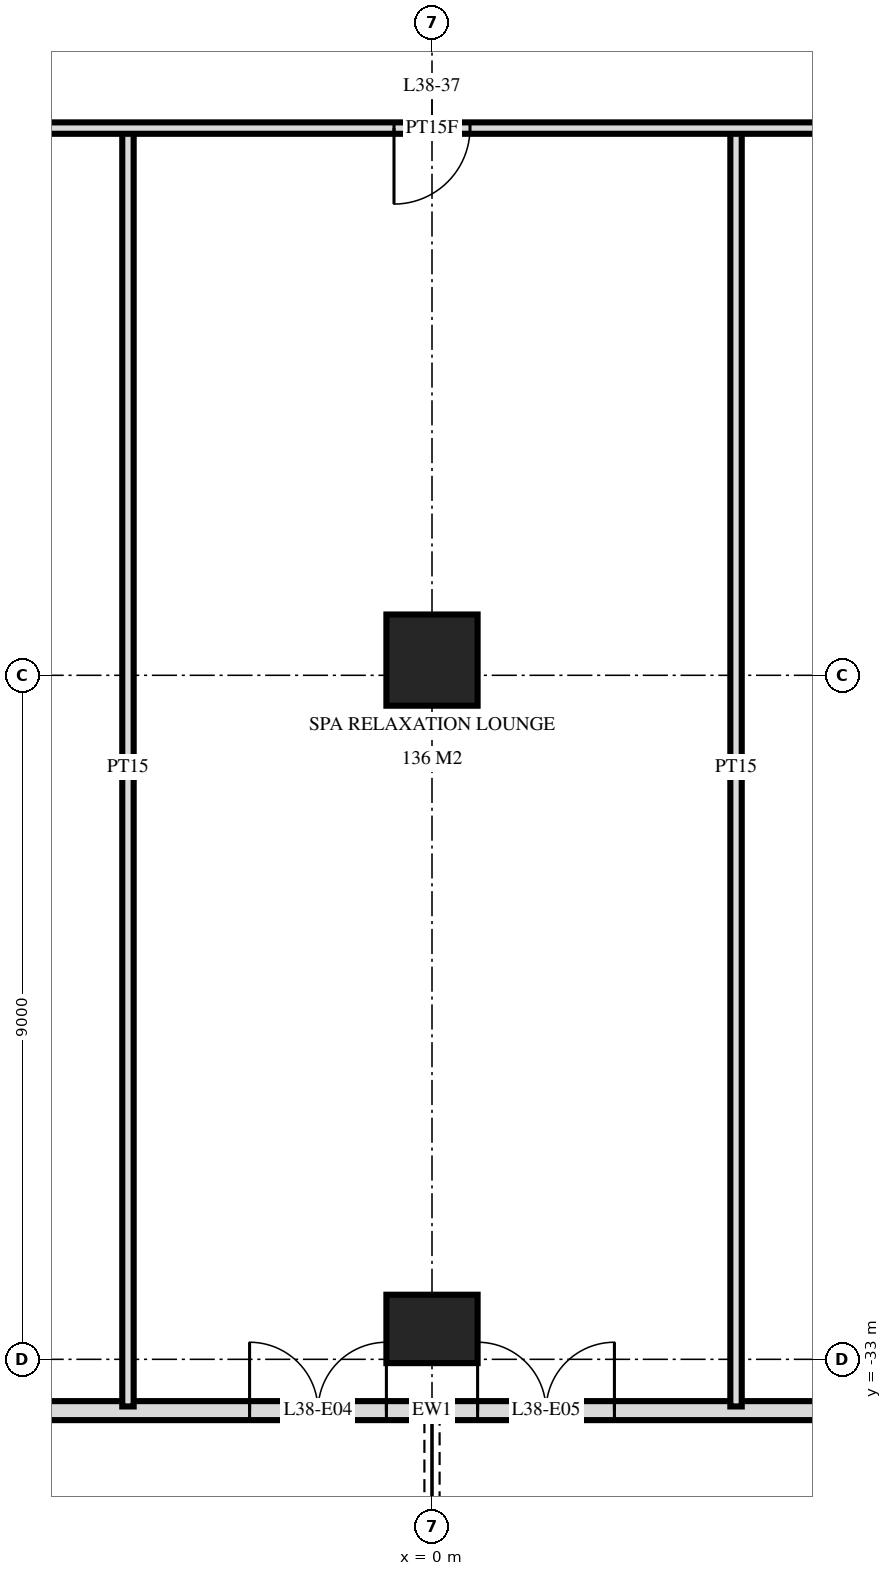
"""IFC4 building model, lengths in metres.
Left out: names, types, materials, properties, quantities, classifications, styles, units other than length and angle.
Written with IfcOpenShell. Run it as: python <this file> out.ifc"""

import sys

from ifc_helpers import new_model, si_unit, direction, frame, frame_2d, origin, origin_2d, place, context, subcontext, project, spatial, rectangle, extrude, element, fill, save


model = new_model("IFC4")
c1 = context("Model", 3, precision=1e-05, world=origin(), true_north=direction((0.0, 1.0)))
c2 = subcontext(c1, "Body", "Model", "MODEL_VIEW")
j1 = project(units=[si_unit("LENGTHUNIT", "METRE"), si_unit("PLANEANGLEUNIT", "RADIAN")], contexts=[c1])
p1 = place(None, origin())
s1 = spatial("IfcSite", under=j1, at=p1, CompositionType="ELEMENT")
p2 = place(p1, origin())
s2 = spatial("IfcBuilding", under=s1, at=p2, CompositionType="ELEMENT")
p3 = place(p2, frame((0.0, 0.0, 148.8)))
s3 = spatial("IfcBuildingStorey", under=s2, at=p3, CompositionType="ELEMENT", Elevation=148.8)
p4 = place(p3, frame((0.0, -32.6, 0.0), z_axis=(0.0, 0.0, 1.0), x_axis=(1.0, 0.0, 0.0)))
e1 = element("IfcColumn", 1, at=p4, inside=s3, PredefinedType="COLUMN", context=c2, shape_type="SweptSolid", body=[
    extrude(rectangle(XDim=1.2, YDim=0.9, at=origin_2d()), origin(), (0.0, 0.0, 1.0), 3.6),
])
p5 = place(p3, frame((0.0, -23.8, 0.0), z_axis=(0.0, 0.0, 1.0), x_axis=(1.0, 0.0, 0.0)))
e2 = element("IfcColumn", 2, at=p5, inside=s3, PredefinedType="COLUMN", context=c2, shape_type="SweptSolid", body=[
    extrude(rectangle(XDim=1.2, YDim=1.2, at=origin_2d()), origin(), (0.0, 0.0, 1.0), 3.6),
])
p6 = place(p3, frame((-23.675, -33.675, 0.0), z_axis=(0.0, 0.0, 1.0), x_axis=(1.0, 0.0, 0.0)))
e3 = element("IfcWall", 3, at=p6, inside=s3, PredefinedType="SOLIDWALL", context=c2, shape_type="SweptSolid", body=[
    extrude(rectangle(XDim=47.351, YDim=0.25, at=frame_2d((23.675, 0.0))), origin(), (0.0, 0.0, 1.0), 3.32),
])
p7 = place(p6, frame((3.425, 0.0, 0.0)))
e4 = element("IfcOpeningElement", 4, at=p7, cuts=e3, PredefinedType="OPENING", context=c2, shape_type="SweptSolid", body=[
    extrude(rectangle(XDim=1.8, YDim=2.4, at=frame_2d((0.9, 1.2))), frame((0.0, 0.135, 0.0), z_axis=(0.0, -1.0, 0.0), x_axis=(1.0, 0.0, 0.0)), (0.0, 0.0, 1.0), 0.27),
])
p8 = place(p6, frame((6.275, 0.0, 0.0)))
e5 = element("IfcOpeningElement", 5, at=p8, cuts=e3, PredefinedType="OPENING", context=c2, shape_type="SweptSolid", body=[
    extrude(rectangle(XDim=1.8, YDim=2.4, at=frame_2d((0.9, 1.2))), frame((0.0, 0.135, 0.0), z_axis=(0.0, -1.0, 0.0), x_axis=(1.0, 0.0, 0.0)), (0.0, 0.0, 1.0), 0.27),
])
p9 = place(p6, frame((8.975, 0.0, 0.3)))
e6 = element("IfcOpeningElement", 6, at=p9, cuts=e3, PredefinedType="OPENING", context=c2, shape_type="SweptSolid", body=[
    extrude(rectangle(XDim=2.4, YDim=2.1, at=frame_2d((1.2, 1.05))), frame((0.0, 0.135, 0.0), z_axis=(0.0, -1.0, 0.0), x_axis=(1.0, 0.0, 0.0)), (0.0, 0.0, 1.0), 0.27),
])
p10 = place(p6, frame((12.275, 0.0, 0.0)))
e7 = element("IfcOpeningElement", 7, at=p10, cuts=e3, PredefinedType="OPENING", context=c2, shape_type="SweptSolid", body=[
    extrude(rectangle(XDim=1.8, YDim=2.4, at=frame_2d((0.9, 1.2))), frame((0.0, 0.135, 0.0), z_axis=(0.0, -1.0, 0.0), x_axis=(1.0, 0.0, 0.0)), (0.0, 0.0, 1.0), 0.27),
])
p11 = place(p6, frame((14.975, 0.0, 0.3)))
e8 = element("IfcOpeningElement", 8, at=p11, cuts=e3, PredefinedType="OPENING", context=c2, shape_type="SweptSolid", body=[
    extrude(rectangle(XDim=2.4, YDim=2.1, at=frame_2d((1.2, 1.05))), frame((0.0, 0.135, 0.0), z_axis=(0.0, -1.0, 0.0), x_axis=(1.0, 0.0, 0.0)), (0.0, 0.0, 1.0), 0.27),
])
p12 = place(p6, frame((21.275, 0.0, 0.0)))
e9 = element("IfcOpeningElement", 9, at=p12, cuts=e3, PredefinedType="OPENING", context=c2, shape_type="SweptSolid", body=[
    extrude(rectangle(XDim=1.8, YDim=2.4, at=frame_2d((0.9, 1.2))), frame((0.0, 0.135, 0.0), z_axis=(0.0, -1.0, 0.0), x_axis=(1.0, 0.0, 0.0)), (0.0, 0.0, 1.0), 0.27),
])
p13 = place(p6, frame((24.275, 0.0, 0.0)))
e10 = element("IfcOpeningElement", 10, at=p13, cuts=e3, PredefinedType="OPENING", context=c2, shape_type="SweptSolid", body=[
    extrude(rectangle(XDim=1.8, YDim=2.4, at=frame_2d((0.9, 1.2))), frame((0.0, 0.135, 0.0), z_axis=(0.0, -1.0, 0.0), x_axis=(1.0, 0.0, 0.0)), (0.0, 0.0, 1.0), 0.27),
])
p14 = place(p6, frame((30.275, 0.0, 0.0)))
e11 = element("IfcOpeningElement", 11, at=p14, cuts=e3, PredefinedType="OPENING", context=c2, shape_type="SweptSolid", body=[
    extrude(rectangle(XDim=1.8, YDim=2.4, at=frame_2d((0.9, 1.2))), frame((0.0, 0.135, 0.0), z_axis=(0.0, -1.0, 0.0), x_axis=(1.0, 0.0, 0.0)), (0.0, 0.0, 1.0), 0.27),
])
p15 = place(p6, frame((32.975, 0.0, 0.3)))
e12 = element("IfcOpeningElement", 12, at=p15, cuts=e3, PredefinedType="OPENING", context=c2, shape_type="SweptSolid", body=[
    extrude(rectangle(XDim=2.4, YDim=2.1, at=frame_2d((1.2, 1.05))), frame((0.0, 0.135, 0.0), z_axis=(0.0, -1.0, 0.0), x_axis=(1.0, 0.0, 0.0)), (0.0, 0.0, 1.0), 0.27),
])
p16 = place(p6, frame((36.275, 0.0, 0.0)))
e13 = element("IfcOpeningElement", 13, at=p16, cuts=e3, PredefinedType="OPENING", context=c2, shape_type="SweptSolid", body=[
    extrude(rectangle(XDim=1.8, YDim=2.4, at=frame_2d((0.9, 1.2))), frame((0.0, 0.135, 0.0), z_axis=(0.0, -1.0, 0.0), x_axis=(1.0, 0.0, 0.0)), (0.0, 0.0, 1.0), 0.27),
])
p17 = place(p6, frame((38.975, 0.0, 0.3)))
e14 = element("IfcOpeningElement", 14, at=p17, cuts=e3, PredefinedType="OPENING", context=c2, shape_type="SweptSolid", body=[
    extrude(rectangle(XDim=2.4, YDim=2.1, at=frame_2d((1.2, 1.05))), frame((0.0, 0.135, 0.0), z_axis=(0.0, -1.0, 0.0), x_axis=(1.0, 0.0, 0.0)), (0.0, 0.0, 1.0), 0.27),
])
p18 = place(p6, frame((42.275, 0.0, 0.0)))
e15 = element("IfcOpeningElement", 15, at=p18, cuts=e3, PredefinedType="OPENING", context=c2, shape_type="SweptSolid", body=[
    extrude(rectangle(XDim=1.8, YDim=2.4, at=frame_2d((0.9, 1.2))), frame((0.0, 0.135, 0.0), z_axis=(0.0, -1.0, 0.0), x_axis=(1.0, 0.0, 0.0)), (0.0, 0.0, 1.0), 0.27),
])
p19 = place(p6, frame((45.125, 0.0, 0.3)))
e16 = element("IfcOpeningElement", 16, at=p19, cuts=e3, PredefinedType="OPENING", context=c2, shape_type="SweptSolid", body=[
    extrude(rectangle(XDim=1.8, YDim=2.1, at=frame_2d((0.9, 1.05))), frame((0.0, 0.135, 0.0), z_axis=(0.0, -1.0, 0.0), x_axis=(1.0, 0.0, 0.0)), (0.0, 0.0, 1.0), 0.27),
])
for number, where, z_axis, x_axis in (
    (17, (4.0, -33.62, 0.0), (0.0, 0.0, 1.0), (0.0, 1.0, 0.0)),
    (18, (-4.0, -33.62, 0.0), (0.0, 0.0, 1.0), (0.0, 1.0, 0.0)),
):
    element("IfcWall", number, at=place(p3, frame(where, z_axis=z_axis, x_axis=x_axis)), inside=s3, PredefinedType="PARTITIONING", context=c2, shape_type="SweptSolid", body=[
        extrude(rectangle(XDim=16.82, YDim=0.15, at=frame_2d((8.41, 0.0))), origin(), (0.0, 0.0, 1.0), 3.32),
    ])
p20 = place(p3, frame((-28.02, -16.8, 0.0), z_axis=(0.0, 0.0, 1.0), x_axis=(1.0, 0.0, 0.0)))
e19 = element("IfcWall", 19, at=p20, inside=s3, PredefinedType="PARTITIONING", context=c2, shape_type="SweptSolid", body=[
    extrude(rectangle(XDim=56.04, YDim=0.15, at=frame_2d((28.02, 0.0))), origin(), (0.0, 0.0, 1.0), 3.32),
])
p21 = place(p20, frame((13.17, 0.0, 0.0)))
e20 = element("IfcOpeningElement", 20, at=p21, cuts=e19, PredefinedType="OPENING", context=c2, shape_type="SweptSolid", body=[
    extrude(rectangle(XDim=1.0, YDim=2.1, at=frame_2d((0.5, 1.05))), frame((0.0, 0.085, 0.0), z_axis=(0.0, -1.0, 0.0), x_axis=(1.0, 0.0, 0.0)), (0.0, 0.0, 1.0), 0.17),
])
p22 = place(p20, frame((11.32, 0.0, 0.0)))
e21 = element("IfcOpeningElement", 21, at=p22, cuts=e19, PredefinedType="OPENING", context=c2, shape_type="SweptSolid", body=[
    extrude(rectangle(XDim=1.0, YDim=2.1, at=frame_2d((0.5, 1.05))), frame((0.0, 0.085, 0.0), z_axis=(0.0, -1.0, 0.0), x_axis=(1.0, 0.0, 0.0)), (0.0, 0.0, 1.0), 0.17),
])
p23 = place(p20, frame((41.87, 0.0, 0.0)))
e22 = element("IfcOpeningElement", 22, at=p23, cuts=e19, PredefinedType="OPENING", context=c2, shape_type="SweptSolid", body=[
    extrude(rectangle(XDim=1.0, YDim=2.1, at=frame_2d((0.5, 1.05))), frame((0.0, 0.085, 0.0), z_axis=(0.0, -1.0, 0.0), x_axis=(1.0, 0.0, 0.0)), (0.0, 0.0, 1.0), 0.17),
])
p24 = place(p20, frame((43.72, 0.0, 0.0)))
e23 = element("IfcOpeningElement", 23, at=p24, cuts=e19, PredefinedType="OPENING", context=c2, shape_type="SweptSolid", body=[
    extrude(rectangle(XDim=1.0, YDim=2.1, at=frame_2d((0.5, 1.05))), frame((0.0, 0.085, 0.0), z_axis=(0.0, -1.0, 0.0), x_axis=(1.0, 0.0, 0.0)), (0.0, 0.0, 1.0), 0.17),
])
p25 = place(p20, frame((19.52, 0.0, 0.0)))
e24 = element("IfcOpeningElement", 24, at=p25, cuts=e19, PredefinedType="OPENING", context=c2, shape_type="SweptSolid", body=[
    extrude(rectangle(XDim=1.0, YDim=2.1, at=frame_2d((0.5, 1.05))), frame((0.0, 0.085, 0.0), z_axis=(0.0, -1.0, 0.0), x_axis=(1.0, 0.0, 0.0)), (0.0, 0.0, 1.0), 0.17),
])
p26 = place(p20, frame((27.52, 0.0, 0.0)))
e25 = element("IfcOpeningElement", 25, at=p26, cuts=e19, PredefinedType="OPENING", context=c2, shape_type="SweptSolid", body=[
    extrude(rectangle(XDim=1.0, YDim=2.1, at=frame_2d((0.5, 1.05))), frame((0.0, 0.085, 0.0), z_axis=(0.0, -1.0, 0.0), x_axis=(1.0, 0.0, 0.0)), (0.0, 0.0, 1.0), 0.17),
])
p27 = place(p20, frame((35.52, 0.0, 0.0)))
e26 = element("IfcOpeningElement", 26, at=p27, cuts=e19, PredefinedType="OPENING", context=c2, shape_type="SweptSolid", body=[
    extrude(rectangle(XDim=1.0, YDim=2.1, at=frame_2d((0.5, 1.05))), frame((0.0, 0.085, 0.0), z_axis=(0.0, -1.0, 0.0), x_axis=(1.0, 0.0, 0.0)), (0.0, 0.0, 1.0), 0.17),
])
p28 = place(p12, origin())
e27 = element("IfcDoor", 27, at=p28, inside=s3, OperationType="DOUBLE_DOOR_SINGLE_SWING", PredefinedType="DOOR", context=c2, shape_type="SweptSolid", body=[
    extrude(rectangle(XDim=1.8, YDim=2.4, at=frame_2d((0.9, 1.2))), frame((0.0, 0.025, 0.0), z_axis=(0.0, -1.0, 0.0), x_axis=(1.0, 0.0, 0.0)), (0.0, 0.0, 1.0), 0.05),
])
fill(e9, e27)
p29 = place(p13, origin())
e28 = element("IfcDoor", 28, at=p29, inside=s3, OperationType="DOUBLE_DOOR_SINGLE_SWING", PredefinedType="DOOR", context=c2, shape_type="SweptSolid", body=[
    extrude(rectangle(XDim=1.8, YDim=2.4, at=frame_2d((0.9, 1.2))), frame((0.0, 0.025, 0.0), z_axis=(0.0, -1.0, 0.0), x_axis=(1.0, 0.0, 0.0)), (0.0, 0.0, 1.0), 0.05),
])
fill(e10, e28)
p30 = place(p26, frame((0.5, 0.0, 0.0), z_axis=(0.0, 0.0, 1.0), x_axis=(-1.0, 0.0, 0.0)))
e29 = element("IfcDoor", 29, at=p30, inside=s3, OperationType="SINGLE_SWING_LEFT", PredefinedType="DOOR", context=c2, shape_type="SweptSolid", body=[
    extrude(rectangle(XDim=1.0, YDim=2.1, at=frame_2d((0.0, 1.05))), frame((0.0, -0.025, 0.0), z_axis=(0.0, 1.0, 0.0), x_axis=(-1.0, 0.0, 0.0)), (0.0, 0.0, 1.0), 0.05),
])
fill(e25, e29)
save(model, sys.argv[1])
